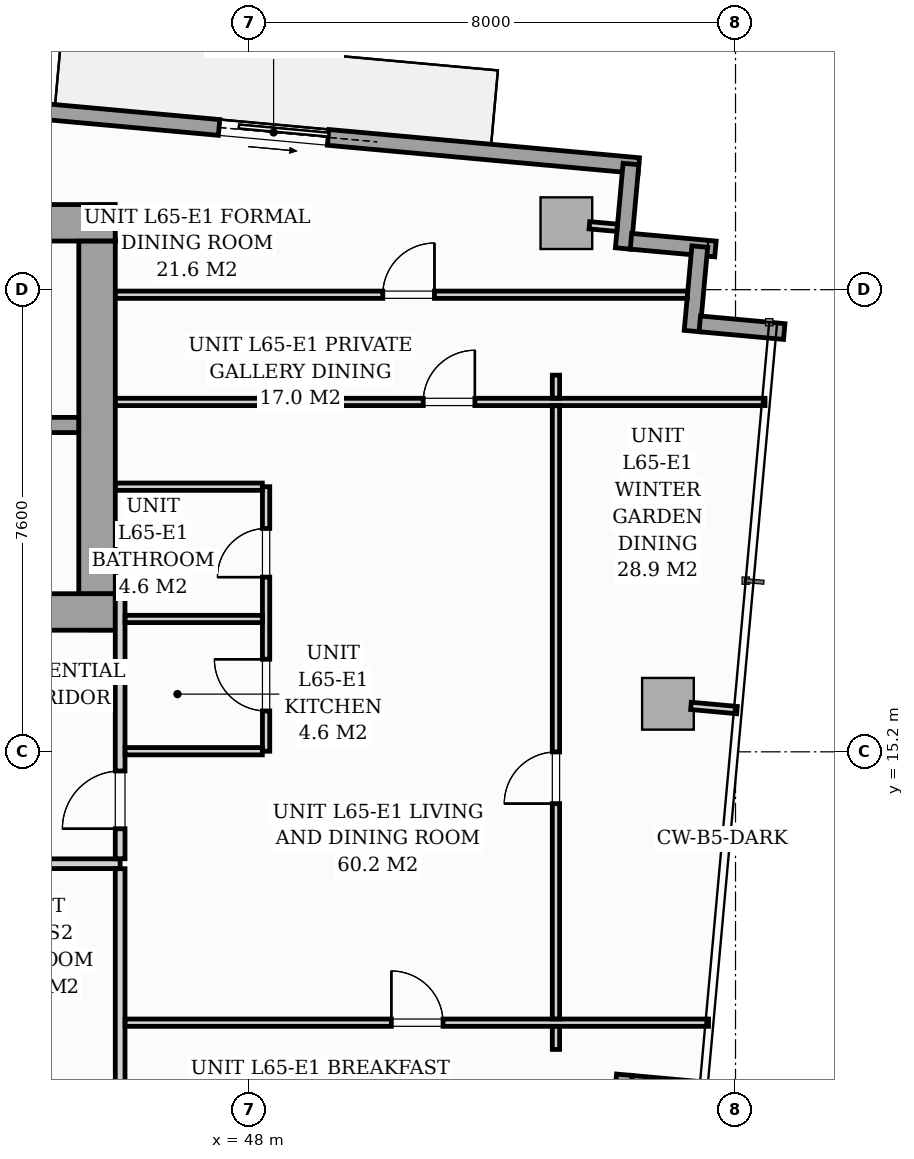
"""IFC4 building model, lengths in metres.
Left out: names, types, materials, properties, quantities, classifications, styles, units other than length and angle.
Written with IfcOpenShell. Run it as: python <this file> out.ifc"""

import sys

from ifc_helpers import new_model, si_unit, direction, frame, frame_2d, origin, origin_2d, place, context, subcontext, project, spatial, rectangle, i_section, extrude, source, transform, mapped, element, fill, save


model = new_model("IFC4")
c1 = context("Model", 3, precision=1e-05, world=origin(), true_north=direction((0.0, 1.0)))
c2 = subcontext(c1, "Body", "Model", "MODEL_VIEW")
j1 = project(units=[si_unit("LENGTHUNIT", "METRE"), si_unit("PLANEANGLEUNIT", "RADIAN")], contexts=[c1])
p1 = place(None, origin())
s1 = spatial("IfcSite", under=j1, at=p1, CompositionType="ELEMENT")
p2 = place(p1, origin())
s2 = spatial("IfcBuilding", under=s1, at=p2, CompositionType="ELEMENT")
p3 = place(p2, frame((0.0, 0.0, 226.5)))
s3 = spatial("IfcBuildingStorey", under=s2, at=p3, CompositionType="ELEMENT", Elevation=226.5)
m1 = source(origin(), c2, "Body", "SweptSolid", [
    extrude(i_section(OverallWidth=0.409, OverallDepth=0.425, WebThickness=0.033, FlangeThickness=0.052, FilletRadius=0.018, at=origin_2d()), origin(), (0.0, 0.0, 1.0), 3.296),
])
for number, where, z_axis, x_axis in (
    (1, (45.6, 17.4, 0.002), (0.0, 0.0, 1.0), (1.0, 0.0, 0.0)),
    (2, (45.6, 24.0, 0.002), (0.0, 0.0, 1.0), (1.0, 0.0, 0.0)),
):
    element("IfcColumn", number, at=place(p3, frame(where, z_axis=z_axis, x_axis=x_axis)), inside=s3, PredefinedType="PILASTER", context=c2, shape_type="MappedRepresentation", body=[
        mapped(m1, transform((0.0, 0.0, 0.0), scale=1.0)),
    ])
m2 = source(origin(), c2, "Body", "SweptSolid", [
    extrude(rectangle(XDim=0.85, YDim=0.85, at=origin_2d()), origin(), (0.0, 0.0, 1.0), 3.296),
])
for number, where, z_axis, x_axis in (
    (3, (53.218, 23.894, 0.002), (0.0, 0.0, 1.0), (0.996, -0.091, 0.0)),
    (4, (54.889, 15.99, 0.002), (0.0, 0.0, 1.0), (0.996, -0.091, 0.0)),
):
    element("IfcColumn", number, at=place(p3, frame(where, z_axis=z_axis, x_axis=x_axis)), inside=s3, PredefinedType="COLUMN", context=c2, shape_type="MappedRepresentation", body=[
        mapped(m2, transform((0.0, 0.0, 0.0), scale=1.0)),
    ])
p4 = place(p3, frame((39.839, 26.166, 0.0), z_axis=(0.0, 0.0, 1.0), x_axis=(0.995884447498, -0.090632043071, 0.0)))
e5 = element("IfcWall", 5, at=p4, inside=s3, PredefinedType="STANDARD", context=c2, shape_type="SweptSolid", body=[
    extrude(rectangle(XDim=14.63, YDim=0.26, at=frame_2d((7.315, 0.0))), origin(), (0.0, 0.0, 1.0), 3.04),
])
p5 = place(p4, frame((7.7, 0.0, 0.0)))
e6 = element("IfcOpeningElement", 6, at=p5, cuts=e5, PredefinedType="OPENING", context=c2, shape_type="SweptSolid", body=[
    extrude(rectangle(XDim=1.8, YDim=2.06, at=frame_2d((0.9, 1.03))), frame((0.0, 0.14, 0.0), z_axis=(0.0, -1.0, 0.0), x_axis=(1.0, 0.0, 0.0)), (0.0, 0.0, 1.0), 0.28),
])
p6 = place(p4, frame((0.7, 0.0, 0.65)))
e7 = element("IfcOpeningElement", 7, at=p6, cuts=e5, PredefinedType="OPENING", context=c2, shape_type="SweptSolid", body=[
    extrude(rectangle(XDim=1.6, YDim=1.5, at=frame_2d((0.8, 0.75))), frame((0.0, 0.14, 0.0), z_axis=(0.0, -1.0, 0.0), x_axis=(1.0, 0.0, 0.0)), (0.0, 0.0, 1.0), 0.28),
])
p7 = place(p3, frame((54.281, 24.866, 0.0), z_axis=(0.0, 0.0, 1.0), x_axis=(-0.090661991521, -0.995881721538, 0.0)))
e8 = element("IfcWall", 8, at=p7, inside=s3, PredefinedType="STANDARD", context=c2, shape_type="SweptSolid", body=[
    extrude(rectangle(XDim=1.395, YDim=0.26, at=frame_2d((0.698, 0.0))), origin(), (0.0, 0.0, 1.0), 3.04),
])
for number, where, z_axis, x_axis in (
    (9, (54.281, 23.596, 0.0), (0.0, 0.0, 1.0), (0.996, -0.091, 0.0)),
    (10, (55.412, 23.508, 0.0), (0.0, 0.0, 1.0), (-0.091, -0.996, 0.0)),
    (11, (55.412, 22.238, 0.0), (0.0, 0.0, 1.0), (0.996, -0.091, 0.0)),
):
    element("IfcWall", number, at=place(p3, frame(where, z_axis=z_axis, x_axis=x_axis)), inside=s3, PredefinedType="STANDARD", context=c2, shape_type="SweptSolid", body=[
        extrude(rectangle(XDim=1.395, YDim=0.26, at=frame_2d((0.698, 0.0))), origin(), (0.0, 0.0, 1.0), 3.04),
    ])
for number, where, z_axis, x_axis in (
    (12, (55.665, 9.623, 0.0), (0.0, 0.0, 1.0), (-0.996, 0.091, 0.0)),
    (13, (54.173, 9.889, 0.0), (0.0, 0.0, 1.0), (-0.091, -0.996, 0.0)),
):
    element("IfcWall", number, at=place(p3, frame(where, z_axis=z_axis, x_axis=x_axis)), inside=s3, PredefinedType="STANDARD", context=c2, shape_type="SweptSolid", body=[
        extrude(rectangle(XDim=1.395, YDim=0.26, at=frame_2d((0.698, 0.0))), origin(), (0.0, 0.0, 1.0), 3.04),
    ])
p8 = place(p3, frame((26.2, 17.5, 0.0), z_axis=(0.0, 0.0, 1.0), x_axis=(1.0, 0.0, 0.0)))
e14 = element("IfcWall", 14, at=p8, inside=s3, PredefinedType="SHEAR", context=c2, shape_type="SweptSolid", body=[
    extrude(rectangle(XDim=19.6, YDim=0.6, at=frame_2d((9.8, 0.0))), origin(), (0.0, 0.0, 1.0), 3.3),
])
p9 = place(p8, frame((0.95, 0.0, 0.0)))
e15 = element("IfcOpeningElement", 15, at=p9, cuts=e14, PredefinedType="OPENING", context=c2, shape_type="SweptSolid", body=[
    extrude(rectangle(XDim=0.95, YDim=2.06, at=frame_2d((0.475, 1.03))), frame((0.0, 0.31, 0.0), z_axis=(0.0, -1.0, 0.0), x_axis=(1.0, 0.0, 0.0)), (0.0, 0.0, 1.0), 0.62),
])
p10 = place(p8, frame((9.38, 0.0, 0.0)))
e16 = element("IfcOpeningElement", 16, at=p10, cuts=e14, PredefinedType="OPENING", context=c2, shape_type="SweptSolid", body=[
    extrude(rectangle(XDim=0.85, YDim=2.0, at=frame_2d((0.425, 1.0))), frame((0.0, 0.31, 0.0), z_axis=(0.0, -1.0, 0.0), x_axis=(1.0, 0.0, 0.0)), (0.0, 0.0, 1.0), 0.62),
])
p11 = place(p8, frame((17.55, 0.0, 0.0)))
e17 = element("IfcOpeningElement", 17, at=p11, cuts=e14, PredefinedType="OPENING", context=c2, shape_type="SweptSolid", body=[
    extrude(rectangle(XDim=0.95, YDim=2.06, at=frame_2d((0.475, 1.03))), frame((0.0, 0.31, 0.0), z_axis=(0.0, -1.0, 0.0), x_axis=(1.0, 0.0, 0.0)), (0.0, 0.0, 1.0), 0.62),
])
p12 = place(p3, frame((26.2, 23.9, 0.0), z_axis=(0.0, 0.0, 1.0), x_axis=(1.0, 0.0, 0.0)))
e18 = element("IfcWall", 18, at=p12, inside=s3, PredefinedType="SHEAR", context=c2, shape_type="SweptSolid", body=[
    extrude(rectangle(XDim=19.6, YDim=0.6, at=frame_2d((9.8, 0.0))), origin(), (0.0, 0.0, 1.0), 3.3),
])
p13 = place(p3, frame((45.5, 17.802, 0.0), z_axis=(0.0, 0.0, 1.0), x_axis=(0.0, 1.0, 0.0)))
e19 = element("IfcWall", 19, at=p13, inside=s3, PredefinedType="SHEAR", context=c2, shape_type="SweptSolid", body=[
    extrude(rectangle(XDim=5.796, YDim=0.6, at=frame_2d((2.898, 0.0))), origin(), (0.0, 0.0, 1.0), 3.3),
])
p14 = place(p3, frame((37.05, 20.575, 0.0), z_axis=(0.0, 0.0, 1.0), x_axis=(1.0, 0.0, 0.0)))
e20 = element("IfcWall", 20, at=p14, inside=s3, PredefinedType="SOLIDWALL", context=c2, shape_type="SweptSolid", body=[
    extrude(rectangle(XDim=8.148, YDim=0.25, at=frame_2d((4.074, 0.0))), origin(), (0.0, 0.0, 1.0), 3.3),
])
p15 = place(p14, frame((6.6, 0.0, 0.0)))
e21 = element("IfcOpeningElement", 21, at=p15, cuts=e20, PredefinedType="OPENING", context=c2, shape_type="SweptSolid", body=[
    extrude(rectangle(XDim=0.95, YDim=2.06, at=frame_2d((0.475, 1.03))), frame((0.0, 0.135, 0.0), z_axis=(0.0, -1.0, 0.0), x_axis=(1.0, 0.0, 0.0)), (0.0, 0.0, 1.0), 0.27),
])
p16 = place(p3, frame((24.55, 13.36, 0.0), z_axis=(0.0, 0.0, 1.0), x_axis=(1.0, 0.0, 0.0)))
e22 = element("IfcWall", 22, at=p16, inside=s3, PredefinedType="PARTITIONING", context=c2, shape_type="SweptSolid", body=[
    extrude(rectangle(XDim=21.33, YDim=0.16, at=frame_2d((10.665, 0.0))), origin(), (0.0, 0.0, 1.0), 2.605),
])
p17 = place(p16, frame((2.37, 0.0, 0.0)))
e23 = element("IfcOpeningElement", 23, at=p17, cuts=e22, PredefinedType="OPENING", context=c2, shape_type="SweptSolid", body=[
    extrude(rectangle(XDim=0.95, YDim=2.06, at=frame_2d((0.475, 1.03))), frame((0.0, 0.09, 0.0), z_axis=(0.0, -1.0, 0.0), x_axis=(1.0, 0.0, 0.0)), (0.0, 0.0, 1.0), 0.18),
])
p18 = place(p16, frame((13.707, 0.0, 0.0)))
e24 = element("IfcOpeningElement", 24, at=p18, cuts=e22, PredefinedType="OPENING", context=c2, shape_type="SweptSolid", body=[
    extrude(rectangle(XDim=0.95, YDim=2.06, at=frame_2d((0.475, 1.03))), frame((0.0, 0.09, 0.0), z_axis=(0.0, -1.0, 0.0), x_axis=(1.0, 0.0, 0.0)), (0.0, 0.0, 1.0), 0.18),
])
p19 = place(p3, frame((45.88, 8.136, 0.0), z_axis=(0.0, 0.0, 1.0), x_axis=(0.0, 1.0, 0.0)))
e25 = element("IfcWall", 25, at=p19, inside=s3, PredefinedType="PARTITIONING", context=c2, shape_type="SweptSolid", body=[
    extrude(rectangle(XDim=5.142, YDim=0.16, at=frame_2d((2.571, 0.0))), origin(), (0.0, 0.0, 1.0), 3.04),
])
p20 = place(p3, frame((45.88, 13.442, 0.0), z_axis=(0.0, 0.0, 1.0), x_axis=(0.0, 1.0, 0.0)))
e26 = element("IfcWall", 26, at=p20, inside=s3, PredefinedType="PARTITIONING", context=c2, shape_type="SweptSolid", body=[
    extrude(rectangle(XDim=4.36, YDim=0.16, at=frame_2d((2.18, 0.0))), origin(), (0.0, 0.0, 1.0), 3.04),
])
p21 = place(p20, frame((0.493, 0.0, 0.0)))
e27 = element("IfcOpeningElement", 27, at=p21, cuts=e26, PredefinedType="OPENING", context=c2, shape_type="SweptSolid", body=[
    extrude(rectangle(XDim=0.95, YDim=2.06, at=frame_2d((0.475, 1.03))), frame((0.0, 0.09, 0.0), z_axis=(0.0, -1.0, 0.0), x_axis=(1.0, 0.0, 0.0)), (0.0, 0.0, 1.0), 0.18),
])
p22 = place(p3, frame((45.88, 23.598, 0.0), z_axis=(0.0, 0.0, 1.0), x_axis=(0.0, 1.0, 0.0)))
e28 = element("IfcWall", 28, at=p22, inside=s3, PredefinedType="PARTITIONING", context=c2, shape_type="SweptSolid", body=[
    extrude(rectangle(XDim=0.452, YDim=0.16, at=frame_2d((0.226, 0.0))), origin(), (0.0, 0.0, 1.0), 3.04),
])
p23 = place(p3, frame((48.28, 15.21, 0.0), z_axis=(0.0, 0.0, 1.0), x_axis=(0.0, 1.0, 0.0)))
e29 = element("IfcWall", 29, at=p23, inside=s3, PredefinedType="PARTITIONING", context=c2, shape_type="SweptSolid", body=[
    extrude(rectangle(XDim=4.35, YDim=0.12, at=frame_2d((2.175, 0.0))), origin(), (0.0, 0.0, 1.0), 3.04),
])
p24 = place(p23, frame((0.662, 0.0, 0.0)))
e30 = element("IfcOpeningElement", 30, at=p24, cuts=e29, PredefinedType="OPENING", context=c2, shape_type="SweptSolid", body=[
    extrude(rectangle(XDim=0.85, YDim=2.05, at=frame_2d((0.425, 1.025))), frame((0.0, 0.07, 0.0), z_axis=(0.0, -1.0, 0.0), x_axis=(1.0, 0.0, 0.0)), (0.0, 0.0, 1.0), 0.14),
])
p25 = place(p23, frame((2.863, 0.0, 0.0)))
e31 = element("IfcOpeningElement", 31, at=p25, cuts=e29, PredefinedType="OPENING", context=c2, shape_type="SweptSolid", body=[
    extrude(rectangle(XDim=0.8, YDim=2.02, at=frame_2d((0.4, 1.01))), frame((0.0, 0.07, 0.0), z_axis=(0.0, -1.0, 0.0), x_axis=(1.0, 0.0, 0.0)), (0.0, 0.0, 1.0), 0.14),
])
p26 = place(p3, frame((45.962, 17.385, 0.0), z_axis=(0.0, 0.0, 1.0), x_axis=(1.0, 0.0, 0.0)))
e32 = element("IfcWall", 32, at=p26, inside=s3, PredefinedType="PARTITIONING", context=c2, shape_type="SweptSolid", body=[
    extrude(rectangle(XDim=2.256, YDim=0.12, at=frame_2d((1.128, 0.0))), origin(), (0.0, 0.0, 1.0), 2.381),
])
p27 = place(p3, frame((45.962, 15.21, 0.0), z_axis=(0.0, 0.0, 1.0), x_axis=(1.0, 0.0, 0.0)))
e33 = element("IfcWall", 33, at=p27, inside=s3, PredefinedType="PARTITIONING", context=c2, shape_type="SweptSolid", body=[
    extrude(rectangle(XDim=2.256, YDim=0.12, at=frame_2d((1.128, 0.0))), origin(), (0.0, 0.0, 1.0), 3.04),
])
p28 = place(p3, frame((45.802, 19.56, 0.0), z_axis=(0.0, 0.0, 1.0), x_axis=(1.0, 0.0, 0.0)))
e34 = element("IfcWall", 34, at=p28, inside=s3, PredefinedType="PARTITIONING", context=c2, shape_type="SweptSolid", body=[
    extrude(rectangle(XDim=2.416, YDim=0.12, at=frame_2d((1.208, 0.0))), origin(), (0.0, 0.0, 1.0), 3.04),
])
p29 = place(p3, frame((45.802, 22.717, 0.0), z_axis=(0.0, 0.0, 1.0), x_axis=(1.0, 0.0, 0.0)))
e35 = element("IfcWall", 35, at=p29, inside=s3, PredefinedType="PARTITIONING", context=c2, shape_type="SweptSolid", body=[
    extrude(rectangle(XDim=9.406, YDim=0.12, at=frame_2d((4.703, 0.0))), origin(), (0.0, 0.0, 1.0), 3.04),
])
p30 = place(p29, frame((4.397, 0.0, 0.0)))
e36 = element("IfcOpeningElement", 36, at=p30, cuts=e35, PredefinedType="OPENING", context=c2, shape_type="SweptSolid", body=[
    extrude(rectangle(XDim=0.85, YDim=2.05, at=frame_2d((0.425, 1.025))), frame((0.0, 0.07, 0.0), z_axis=(0.0, -1.0, 0.0), x_axis=(1.0, 0.0, 0.0)), (0.0, 0.0, 1.0), 0.14),
])
p31 = place(p3, frame((45.962, 10.746, 0.0), z_axis=(0.0, 0.0, 1.0), x_axis=(1.0, 0.0, 0.0)))
e37 = element("IfcWall", 37, at=p31, inside=s3, PredefinedType="PARTITIONING", context=c2, shape_type="SweptSolid", body=[
    extrude(rectangle(XDim=9.594, YDim=0.12, at=frame_2d((4.797, 0.0))), origin(), (0.0, 0.0, 1.0), 3.04),
])
p32 = place(p31, frame((4.378, 0.0, 0.0)))
e38 = element("IfcOpeningElement", 38, at=p32, cuts=e37, PredefinedType="OPENING", context=c2, shape_type="SweptSolid", body=[
    extrude(rectangle(XDim=0.85, YDim=2.05, at=frame_2d((0.425, 1.025))), frame((0.0, 0.07, 0.0), z_axis=(0.0, -1.0, 0.0), x_axis=(1.0, 0.0, 0.0)), (0.0, 0.0, 1.0), 0.14),
])
p33 = place(p3, frame((45.802, 20.954, 0.0), z_axis=(0.0, 0.0, 1.0), x_axis=(1.0, 0.0, 0.0)))
e39 = element("IfcWall", 39, at=p33, inside=s3, PredefinedType="PARTITIONING", context=c2, shape_type="SweptSolid", body=[
    extrude(rectangle(XDim=10.683, YDim=0.12, at=frame_2d((5.342, 0.0))), origin(), (0.0, 0.0, 1.0), 3.04),
])
p34 = place(p33, frame((5.062, 0.0, 0.0)))
e40 = element("IfcOpeningElement", 40, at=p34, cuts=e39, PredefinedType="OPENING", context=c2, shape_type="SweptSolid", body=[
    extrude(rectangle(XDim=0.85, YDim=2.05, at=frame_2d((0.425, 1.025))), frame((0.0, 0.07, 0.0), z_axis=(0.0, -1.0, 0.0), x_axis=(1.0, 0.0, 0.0)), (0.0, 0.0, 1.0), 0.14),
])
p35 = place(p3, frame((53.047, 10.306, 0.0), z_axis=(0.0, 0.0, 1.0), x_axis=(0.0, 1.0, 0.0)))
e41 = element("IfcWall", 41, at=p35, inside=s3, PredefinedType="PARTITIONING", context=c2, shape_type="SweptSolid", body=[
    extrude(rectangle(XDim=0.378, YDim=0.12, at=frame_2d((0.189, 0.0))), origin(), (0.0, 0.0, 1.0), 3.04),
])
p36 = place(p3, frame((53.047, 10.808, 0.0), z_axis=(0.0, 0.0, 1.0), x_axis=(0.0, 1.0, 0.0)))
e42 = element("IfcWall", 42, at=p36, inside=s3, PredefinedType="PARTITIONING", context=c2, shape_type="SweptSolid", body=[
    extrude(rectangle(XDim=10.084, YDim=0.12, at=frame_2d((5.042, 0.0))), origin(), (0.0, 0.0, 1.0), 3.04),
])
p37 = place(p36, frame((3.54, 0.0, 0.0)))
e43 = element("IfcOpeningElement", 43, at=p37, cuts=e42, PredefinedType="OPENING", context=c2, shape_type="SweptSolid", body=[
    extrude(rectangle(XDim=0.85, YDim=2.05, at=frame_2d((0.425, 1.025))), frame((0.0, 0.07, 0.0), z_axis=(0.0, -1.0, 0.0), x_axis=(1.0, 0.0, 0.0)), (0.0, 0.0, 1.0), 0.14),
])
p38 = place(p3, frame((53.047, 21.016, 0.0), z_axis=(0.0, 0.0, 1.0), x_axis=(0.0, 1.0, 0.0)))
e44 = element("IfcWall", 44, at=p38, inside=s3, PredefinedType="PARTITIONING", context=c2, shape_type="SweptSolid", body=[
    extrude(rectangle(XDim=0.378, YDim=0.12, at=frame_2d((0.189, 0.0))), origin(), (0.0, 0.0, 1.0), 3.04),
])
p39 = place(p3, frame((53.597, 23.859, 0.0), z_axis=(0.0, 0.0, 1.0), x_axis=(0.995884462012, -0.090631883588, 0.0)))
e45 = element("IfcWall", 45, at=p39, inside=s3, PredefinedType="PARTITIONING", context=c2, shape_type="SweptSolid", body=[
    extrude(rectangle(XDim=0.458, YDim=0.12, at=frame_2d((0.229, 0.0))), origin(), (0.0, 0.0, 1.0), 3.04),
])
p40 = place(p3, frame((55.267, 15.955, 0.0), z_axis=(0.0, 0.0, 1.0), x_axis=(0.995887938321, -0.09059367697, 0.0)))
e46 = element("IfcWall", 46, at=p40, inside=s3, PredefinedType="PARTITIONING", context=c2, shape_type="SweptSolid", body=[
    extrude(rectangle(XDim=0.76, YDim=0.12, at=frame_2d((0.38, 0.0))), origin(), (0.0, 0.0, 1.0), 3.04),
])
m3 = source(origin(), c2, "Body", "SweptSolid", [
    extrude(rectangle(XDim=1.8, YDim=2.06, at=frame_2d((0.9, 1.03))), frame((0.0, 0.025, 0.0), z_axis=(0.0, -1.0, 0.0), x_axis=(1.0, 0.0, 0.0)), (0.0, 0.0, 1.0), 0.05),
])
p41 = place(p5, origin())
e47 = element("IfcDoor", 47, at=p41, inside=s3, OperationType="SLIDING_TO_RIGHT", PredefinedType="DOOR", context=c2, shape_type="MappedRepresentation", body=[
    mapped(m3, transform((0.0, 0.0, 0.0), scale=1.0)),
])
fill(e6, e47)
m4 = source(origin(), c2, "Body", "SweptSolid", [
    extrude(rectangle(XDim=0.95, YDim=2.06, at=frame_2d((0.475, 1.03))), frame((0.0, 0.025, 0.0), z_axis=(0.0, -1.0, 0.0), x_axis=(1.0, 0.0, 0.0)), (0.0, 0.0, 1.0), 0.05),
])
p42 = place(p21, origin())
e48 = element("IfcDoor", 48, at=p42, inside=s3, OperationType="SINGLE_SWING_LEFT", PredefinedType="DOOR", context=c2, shape_type="MappedRepresentation", body=[
    mapped(m4, transform((0.0, 0.0, 0.0), scale=1.0)),
])
fill(e27, e48)
m5 = source(origin(), c2, "Body", "SweptSolid", [
    extrude(rectangle(XDim=0.85, YDim=2.05, at=frame_2d((0.425, 1.025))), frame((0.0, 0.025, 0.0), z_axis=(0.0, -1.0, 0.0), x_axis=(1.0, 0.0, 0.0)), (0.0, 0.0, 1.0), 0.05),
])
p43 = place(p24, origin())
e49 = element("IfcDoor", 49, at=p43, inside=s3, OperationType="SINGLE_SWING_RIGHT", PredefinedType="DOOR", context=c2, shape_type="MappedRepresentation", body=[
    mapped(m5, transform((0.0, 0.0, 0.0), scale=1.0)),
])
fill(e30, e49)
m6 = source(origin(), c2, "Body", "SweptSolid", [
    extrude(rectangle(XDim=0.8, YDim=2.02, at=frame_2d((0.4, 1.01))), frame((0.0, 0.025, 0.0), z_axis=(0.0, -1.0, 0.0), x_axis=(1.0, 0.0, 0.0)), (0.0, 0.0, 1.0), 0.05),
])
p44 = place(p25, origin())
e50 = element("IfcDoor", 50, at=p44, inside=s3, OperationType="SINGLE_SWING_LEFT", PredefinedType="DOOR", context=c2, shape_type="MappedRepresentation", body=[
    mapped(m6, transform((0.0, 0.0, 0.0), scale=1.0)),
])
fill(e31, e50)
p45 = place(p30, origin())
e51 = element("IfcDoor", 51, at=p45, inside=s3, OperationType="SINGLE_SWING_RIGHT", PredefinedType="DOOR", context=c2, shape_type="MappedRepresentation", body=[
    mapped(m5, transform((0.0, 0.0, 0.0), scale=1.0)),
])
fill(e36, e51)
p46 = place(p32, origin())
e52 = element("IfcDoor", 52, at=p46, inside=s3, OperationType="SINGLE_SWING_LEFT", PredefinedType="DOOR", context=c2, shape_type="MappedRepresentation", body=[
    mapped(m5, transform((0.0, 0.0, 0.0), scale=1.0)),
])
fill(e38, e52)
p47 = place(p34, origin())
e53 = element("IfcDoor", 53, at=p47, inside=s3, OperationType="SINGLE_SWING_RIGHT", PredefinedType="DOOR", context=c2, shape_type="MappedRepresentation", body=[
    mapped(m5, transform((0.0, 0.0, 0.0), scale=1.0)),
])
fill(e40, e53)
p48 = place(p37, origin())
e54 = element("IfcDoor", 54, at=p48, inside=s3, OperationType="SINGLE_SWING_LEFT", PredefinedType="DOOR", context=c2, shape_type="MappedRepresentation", body=[
    mapped(m5, transform((0.0, 0.0, 0.0), scale=1.0)),
])
fill(e43, e54)
save(model, sys.argv[1])
